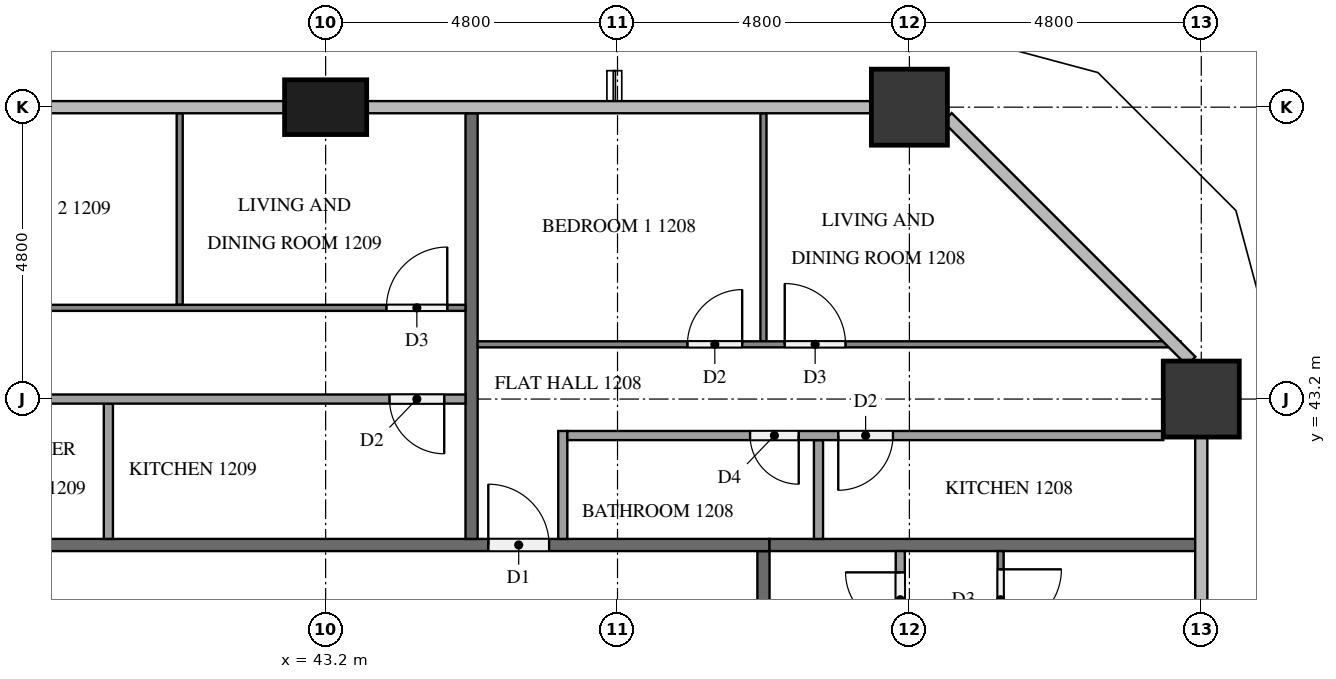
"""IFC4 building model, lengths in metres.
Left out: names, types, materials, properties, quantities, classifications, styles, units other than length and angle.
Written with IfcOpenShell. Run it as: python <this file> out.ifc"""

import sys

from ifc_helpers import new_model, si_unit, direction, frame, frame_2d, origin, origin_2d, place, context, subcontext, project, spatial, rectangle, extrude, element, fill, save


model = new_model("IFC4")
c1 = context("Model", 3, precision=1e-05, world=origin(), true_north=direction((0.0, 1.0)))
c2 = subcontext(c1, "Body", "Model", "MODEL_VIEW")
j1 = project(units=[si_unit("LENGTHUNIT", "METRE"), si_unit("PLANEANGLEUNIT", "RADIAN")], contexts=[c1])
p1 = place(None, origin())
s1 = spatial("IfcSite", under=j1, at=p1, CompositionType="ELEMENT")
p2 = place(p1, origin())
s2 = spatial("IfcBuilding", under=s1, at=p2, CompositionType="ELEMENT")
p3 = place(p2, frame((0.0, 0.0, 50.4)))
s3 = spatial("IfcBuildingStorey", under=s2, at=p3, CompositionType="ELEMENT", Elevation=50.4)
for number, where, z_axis, x_axis in (
    (1, (57.6, 43.2, 0.0), (0.0, 0.0, 1.0), (1.0, 0.0, 0.0)),
    (2, (52.8, 48.0, 0.0), (0.0, 0.0, 1.0), (1.0, 0.0, 0.0)),
):
    element("IfcColumn", number, at=place(p3, frame(where, z_axis=z_axis, x_axis=x_axis)), inside=s3, PredefinedType="COLUMN", context=c2, shape_type="SweptSolid", body=[
        extrude(rectangle(XDim=1.25, YDim=1.25, at=origin_2d()), origin(), (0.0, 0.0, 1.0), 3.1),
    ])
p4 = place(p3, frame((43.2, 48.0, 0.0), z_axis=(0.0, 0.0, 1.0), x_axis=(1.0, 0.0, 0.0)))
e3 = element("IfcColumn", 3, at=p4, inside=s3, PredefinedType="COLUMN", context=c2, shape_type="SweptSolid", body=[
    extrude(rectangle(XDim=1.35, YDim=0.9, at=origin_2d()), origin(), (0.0, 0.0, 1.0), 3.1),
])
p5 = place(p3, frame((50.4, 40.7, 0.0), z_axis=(0.0, 0.0, 1.0), x_axis=(0.0, -1.0, 0.0)))
e4 = element("IfcWall", 4, at=p5, inside=s3, PredefinedType="PARTITIONING", context=c2, shape_type="SweptSolid", body=[
    extrude(rectangle(XDim=28.6, YDim=0.2, at=frame_2d((14.3, 0.0))), origin(), (0.0, 0.0, 1.0), 3.1),
])
p6 = place(p5, frame((21.725, 0.0, 0.0)))
e5 = element("IfcOpeningElement", 5, at=p6, cuts=e4, PredefinedType="OPENING", context=c2, shape_type="SweptSolid", body=[
    extrude(rectangle(XDim=1.1, YDim=2.1, at=frame_2d((0.55, 1.05))), frame((0.0, 0.11, 0.0), z_axis=(0.0, -1.0, 0.0), x_axis=(1.0, 0.0, 0.0)), (0.0, 0.0, 1.0), 0.22),
])
p7 = place(p5, frame((12.175, 0.0, 0.0)))
e6 = element("IfcOpeningElement", 6, at=p7, cuts=e4, PredefinedType="OPENING", context=c2, shape_type="SweptSolid", body=[
    extrude(rectangle(XDim=1.0, YDim=2.1, at=frame_2d((0.5, 1.05))), frame((0.0, 0.11, 0.0), z_axis=(0.0, -1.0, 0.0), x_axis=(1.0, 0.0, 0.0)), (0.0, 0.0, 1.0), 0.22),
])
p8 = place(p5, frame((10.625, 0.0, 0.0)))
e7 = element("IfcOpeningElement", 7, at=p8, cuts=e4, PredefinedType="OPENING", context=c2, shape_type="SweptSolid", body=[
    extrude(rectangle(XDim=1.0, YDim=2.1, at=frame_2d((0.5, 1.05))), frame((0.0, 0.11, 0.0), z_axis=(0.0, -1.0, 0.0), x_axis=(1.0, 0.0, 0.0)), (0.0, 0.0, 1.0), 0.22),
])
p9 = place(p3, frame((11.9, 40.8, 0.0), z_axis=(0.0, 0.0, 1.0), x_axis=(1.0, 0.0, 0.0)))
e8 = element("IfcWall", 8, at=p9, inside=s3, PredefinedType="PARTITIONING", context=c2, shape_type="SweptSolid", body=[
    extrude(rectangle(XDim=38.6, YDim=0.2, at=frame_2d((19.3, 0.0))), origin(), (0.0, 0.0, 1.0), 3.1),
])
p10 = place(p9, frame((33.975, 0.0, 0.0)))
e9 = element("IfcOpeningElement", 9, at=p10, cuts=e8, PredefinedType="OPENING", context=c2, shape_type="SweptSolid", body=[
    extrude(rectangle(XDim=1.0, YDim=2.1, at=frame_2d((0.5, 1.05))), frame((0.0, 0.11, 0.0), z_axis=(0.0, -1.0, 0.0), x_axis=(1.0, 0.0, 0.0)), (0.0, 0.0, 1.0), 0.22),
])
p11 = place(p9, frame((19.575, 0.0, 0.0)))
e10 = element("IfcOpeningElement", 10, at=p11, cuts=e8, PredefinedType="OPENING", context=c2, shape_type="SweptSolid", body=[
    extrude(rectangle(XDim=1.0, YDim=2.1, at=frame_2d((0.5, 1.05))), frame((0.0, 0.11, 0.0), z_axis=(0.0, -1.0, 0.0), x_axis=(1.0, 0.0, 0.0)), (0.0, 0.0, 1.0), 0.22),
])
p12 = place(p9, frame((18.025, 0.0, 0.0)))
e11 = element("IfcOpeningElement", 11, at=p12, cuts=e8, PredefinedType="OPENING", context=c2, shape_type="SweptSolid", body=[
    extrude(rectangle(XDim=1.0, YDim=2.1, at=frame_2d((0.5, 1.05))), frame((0.0, 0.11, 0.0), z_axis=(0.0, -1.0, 0.0), x_axis=(1.0, 0.0, 0.0)), (0.0, 0.0, 1.0), 0.22),
])
p13 = place(p9, frame((3.625, 0.0, 0.0)))
e12 = element("IfcOpeningElement", 12, at=p13, cuts=e8, PredefinedType="OPENING", context=c2, shape_type="SweptSolid", body=[
    extrude(rectangle(XDim=1.0, YDim=2.1, at=frame_2d((0.5, 1.05))), frame((0.0, 0.11, 0.0), z_axis=(0.0, -1.0, 0.0), x_axis=(1.0, 0.0, 0.0)), (0.0, 0.0, 1.0), 0.22),
])
for number, where, z_axis, x_axis in (
    (13, (50.5, 40.8, 0.0), (0.0, 0.0, 1.0), (1.0, 0.0, 0.0)),
    (14, (45.6, 47.9, 0.0), (0.0, 0.0, 1.0), (0.0, -1.0, 0.0)),
):
    element("IfcWall", number, at=place(p3, frame(where, z_axis=z_axis, x_axis=x_axis)), inside=s3, PredefinedType="PARTITIONING", context=c2, shape_type="SweptSolid", body=[
        extrude(rectangle(XDim=7.0, YDim=0.2, at=frame_2d((3.5, 0.0))), origin(), (0.0, 0.0, 1.0), 3.1),
    ])
p14 = place(p3, frame((54.3, 40.7, 0.0), z_axis=(0.0, 0.0, 1.0), x_axis=(0.0, -1.0, 0.0)))
e15 = element("IfcWall", 15, at=p14, inside=s3, PredefinedType="PARTITIONING", context=c2, shape_type="SweptSolid", body=[
    extrude(rectangle(XDim=11.8, YDim=0.1, at=frame_2d((5.9, 0.0))), origin(), (0.0, 0.0, 1.0), 3.1),
])
p15 = place(p14, frame((10.6, 0.0, 0.0)))
e16 = element("IfcOpeningElement", 16, at=p15, cuts=e15, PredefinedType="OPENING", context=c2, shape_type="SweptSolid", body=[
    extrude(rectangle(XDim=0.9, YDim=2.1, at=frame_2d((0.45, 1.05))), frame((0.0, 0.06, 0.0), z_axis=(0.0, -1.0, 0.0), x_axis=(1.0, 0.0, 0.0)), (0.0, 0.0, 1.0), 0.12),
])
p16 = place(p14, frame((0.3, 0.0, 0.0)))
e17 = element("IfcOpeningElement", 17, at=p16, cuts=e15, PredefinedType="OPENING", context=c2, shape_type="SweptSolid", body=[
    extrude(rectangle(XDim=1.0, YDim=2.1, at=frame_2d((0.5, 1.05))), frame((0.0, 0.06, 0.0), z_axis=(0.0, -1.0, 0.0), x_axis=(1.0, 0.0, 0.0)), (0.0, 0.0, 1.0), 0.12),
])
p17 = place(p3, frame((52.65, 30.375, 0.0), z_axis=(0.0, 0.0, 1.0), x_axis=(0.0, 1.0, 0.0)))
e18 = element("IfcWall", 18, at=p17, inside=s3, PredefinedType="PARTITIONING", context=c2, shape_type="SweptSolid", body=[
    extrude(rectangle(XDim=10.325, YDim=0.15, at=frame_2d((5.163, 0.0))), origin(), (0.0, 0.0, 1.0), 3.1),
])
p18 = place(p17, frame((0.3, 0.0, 0.0)))
e19 = element("IfcOpeningElement", 19, at=p18, cuts=e18, PredefinedType="OPENING", context=c2, shape_type="SweptSolid", body=[
    extrude(rectangle(XDim=0.8, YDim=2.1, at=frame_2d((0.4, 1.05))), frame((0.0, 0.085, 0.0), z_axis=(0.0, -1.0, 0.0), x_axis=(1.0, 0.0, 0.0)), (0.0, 0.0, 1.0), 0.17),
])
p19 = place(p17, frame((9.075, 0.0, 0.0)))
e20 = element("IfcOpeningElement", 20, at=p19, cuts=e18, PredefinedType="OPENING", context=c2, shape_type="SweptSolid", body=[
    extrude(rectangle(XDim=0.9, YDim=2.1, at=frame_2d((0.45, 1.05))), frame((0.0, 0.085, 0.0), z_axis=(0.0, -1.0, 0.0), x_axis=(1.0, 0.0, 0.0)), (0.0, 0.0, 1.0), 0.17),
])
p20 = place(p3, frame((50.4, 44.15, 0.0), z_axis=(0.0, 0.0, 1.0), x_axis=(0.0, 1.0, 0.0)))
e21 = element("IfcWall", 21, at=p20, inside=s3, PredefinedType="PARTITIONING", context=c2, shape_type="SweptSolid", body=[
    extrude(rectangle(XDim=3.75, YDim=0.1, at=frame_2d((1.875, 0.0))), origin(), (0.0, 0.0, 1.0), 3.1),
])
p21 = place(p3, frame((45.7, 44.1, 0.0), z_axis=(0.0, 0.0, 1.0), x_axis=(1.0, 0.0, 0.0)))
e22 = element("IfcWall", 22, at=p21, inside=s3, PredefinedType="PARTITIONING", context=c2, shape_type="SweptSolid", body=[
    extrude(rectangle(XDim=11.559, YDim=0.1, at=frame_2d((5.779, 0.0))), origin(), (0.0, 0.0, 1.0), 3.1),
])
p22 = place(p21, frame((3.45, 0.0, 0.0)))
e23 = element("IfcOpeningElement", 23, at=p22, cuts=e22, PredefinedType="OPENING", context=c2, shape_type="SweptSolid", body=[
    extrude(rectangle(XDim=0.9, YDim=2.1, at=frame_2d((0.45, 1.05))), frame((0.0, 0.06, 0.0), z_axis=(0.0, -1.0, 0.0), x_axis=(1.0, 0.0, 0.0)), (0.0, 0.0, 1.0), 0.12),
])
p23 = place(p21, frame((5.05, 0.0, 0.0)))
e24 = element("IfcOpeningElement", 24, at=p23, cuts=e22, PredefinedType="OPENING", context=c2, shape_type="SweptSolid", body=[
    extrude(rectangle(XDim=1.0, YDim=2.1, at=frame_2d((0.5, 1.05))), frame((0.0, 0.06, 0.0), z_axis=(0.0, -1.0, 0.0), x_axis=(1.0, 0.0, 0.0)), (0.0, 0.0, 1.0), 0.12),
])
p24 = place(p3, frame((51.305, 40.9, 0.0), z_axis=(0.0, 0.0, 1.0), x_axis=(0.0, 1.0, 0.0)))
e25 = element("IfcWall", 25, at=p24, inside=s3, PredefinedType="PARTITIONING", context=c2, shape_type="SweptSolid", body=[
    extrude(rectangle(XDim=1.625, YDim=0.15, at=frame_2d((0.812, 0.0))), origin(), (0.0, 0.0, 1.0), 3.1),
])
p25 = place(p3, frame((47.1, 40.9, 0.0), z_axis=(0.0, 0.0, 1.0), x_axis=(0.0, 1.0, 0.0)))
e26 = element("IfcWall", 26, at=p25, inside=s3, PredefinedType="PARTITIONING", context=c2, shape_type="SweptSolid", body=[
    extrude(rectangle(XDim=1.775, YDim=0.15, at=frame_2d((0.888, 0.0))), origin(), (0.0, 0.0, 1.0), 3.1),
])
p26 = place(p3, frame((56.975, 42.6, 0.0), z_axis=(0.0, 0.0, 1.0), x_axis=(-1.0, 0.0, 0.0)))
e27 = element("IfcWall", 27, at=p26, inside=s3, PredefinedType="PARTITIONING", context=c2, shape_type="SweptSolid", body=[
    extrude(rectangle(XDim=9.8, YDim=0.15, at=frame_2d((4.9, 0.0))), origin(), (0.0, 0.0, 1.0), 3.1),
])
p27 = place(p26, frame((5.995, 0.0, 0.0)))
e28 = element("IfcOpeningElement", 28, at=p27, cuts=e27, PredefinedType="OPENING", context=c2, shape_type="SweptSolid", body=[
    extrude(rectangle(XDim=0.8, YDim=2.1, at=frame_2d((0.4, 1.05))), frame((0.0, 0.085, 0.0), z_axis=(0.0, -1.0, 0.0), x_axis=(1.0, 0.0, 0.0)), (0.0, 0.0, 1.0), 0.17),
])
p28 = place(p26, frame((4.445, 0.0, 0.0)))
e29 = element("IfcOpeningElement", 29, at=p28, cuts=e27, PredefinedType="OPENING", context=c2, shape_type="SweptSolid", body=[
    extrude(rectangle(XDim=0.9, YDim=2.1, at=frame_2d((0.45, 1.05))), frame((0.0, 0.085, 0.0), z_axis=(0.0, -1.0, 0.0), x_axis=(1.0, 0.0, 0.0)), (0.0, 0.0, 1.0), 0.17),
])
p29 = place(p3, frame((40.8, 44.75, 0.0), z_axis=(0.0, 0.0, 1.0), x_axis=(0.0, 1.0, 0.0)))
e30 = element("IfcWall", 30, at=p29, inside=s3, PredefinedType="PARTITIONING", context=c2, shape_type="SweptSolid", body=[
    extrude(rectangle(XDim=3.15, YDim=0.1, at=frame_2d((1.575, 0.0))), origin(), (0.0, 0.0, 1.0), 3.1),
])
p30 = place(p3, frame((31.3, 44.7, 0.0), z_axis=(0.0, 0.0, 1.0), x_axis=(1.0, 0.0, 0.0)))
e31 = element("IfcWall", 31, at=p30, inside=s3, PredefinedType="PARTITIONING", context=c2, shape_type="SweptSolid", body=[
    extrude(rectangle(XDim=14.2, YDim=0.1, at=frame_2d((7.1, 0.0))), origin(), (0.0, 0.0, 1.0), 3.1),
])
p31 = place(p30, frame((3.45, 0.0, 0.0)))
e32 = element("IfcOpeningElement", 32, at=p31, cuts=e31, PredefinedType="OPENING", context=c2, shape_type="SweptSolid", body=[
    extrude(rectangle(XDim=0.9, YDim=2.1, at=frame_2d((0.45, 1.05))), frame((0.0, 0.06, 0.0), z_axis=(0.0, -1.0, 0.0), x_axis=(1.0, 0.0, 0.0)), (0.0, 0.0, 1.0), 0.12),
])
p32 = place(p30, frame((5.05, 0.0, 0.0)))
e33 = element("IfcOpeningElement", 33, at=p32, cuts=e31, PredefinedType="OPENING", context=c2, shape_type="SweptSolid", body=[
    extrude(rectangle(XDim=0.9, YDim=2.1, at=frame_2d((0.45, 1.05))), frame((0.0, 0.06, 0.0), z_axis=(0.0, -1.0, 0.0), x_axis=(1.0, 0.0, 0.0)), (0.0, 0.0, 1.0), 0.12),
])
p33 = place(p30, frame((12.9, 0.0, 0.0)))
e34 = element("IfcOpeningElement", 34, at=p33, cuts=e31, PredefinedType="OPENING", context=c2, shape_type="SweptSolid", body=[
    extrude(rectangle(XDim=1.0, YDim=2.1, at=frame_2d((0.5, 1.05))), frame((0.0, 0.06, 0.0), z_axis=(0.0, -1.0, 0.0), x_axis=(1.0, 0.0, 0.0)), (0.0, 0.0, 1.0), 0.12),
])
p34 = place(p3, frame((39.627, 40.9, 0.0), z_axis=(0.0, 0.0, 1.0), x_axis=(0.0, 1.0, 0.0)))
e35 = element("IfcWall", 35, at=p34, inside=s3, PredefinedType="PARTITIONING", context=c2, shape_type="SweptSolid", body=[
    extrude(rectangle(XDim=2.225, YDim=0.15, at=frame_2d((1.113, 0.0))), origin(), (0.0, 0.0, 1.0), 3.1),
])
p35 = place(p3, frame((45.5, 43.2, 0.0), z_axis=(0.0, 0.0, 1.0), x_axis=(-1.0, 0.0, 0.0)))
e36 = element("IfcWall", 36, at=p35, inside=s3, PredefinedType="PARTITIONING", context=c2, shape_type="SweptSolid", body=[
    extrude(rectangle(XDim=12.725, YDim=0.15, at=frame_2d((6.363, 0.0))), origin(), (0.0, 0.0, 1.0), 3.1),
])
p36 = place(p35, frame((9.135, 0.0, 0.0)))
e37 = element("IfcOpeningElement", 37, at=p36, cuts=e36, PredefinedType="OPENING", context=c2, shape_type="SweptSolid", body=[
    extrude(rectangle(XDim=0.9, YDim=2.1, at=frame_2d((0.45, 1.05))), frame((0.0, 0.085, 0.0), z_axis=(0.0, -1.0, 0.0), x_axis=(1.0, 0.0, 0.0)), (0.0, 0.0, 1.0), 0.17),
])
p37 = place(p35, frame((7.685, 0.0, 0.0)))
e38 = element("IfcOpeningElement", 38, at=p37, cuts=e36, PredefinedType="OPENING", context=c2, shape_type="SweptSolid", body=[
    extrude(rectangle(XDim=0.8, YDim=2.1, at=frame_2d((0.4, 1.05))), frame((0.0, 0.085, 0.0), z_axis=(0.0, -1.0, 0.0), x_axis=(1.0, 0.0, 0.0)), (0.0, 0.0, 1.0), 0.17),
])
p38 = place(p35, frame((0.35, 0.0, 0.0)))
e39 = element("IfcOpeningElement", 39, at=p38, cuts=e36, PredefinedType="OPENING", context=c2, shape_type="SweptSolid", body=[
    extrude(rectangle(XDim=0.9, YDim=2.1, at=frame_2d((0.45, 1.05))), frame((0.0, 0.085, 0.0), z_axis=(0.0, -1.0, 0.0), x_axis=(1.0, 0.0, 0.0)), (0.0, 0.0, 1.0), 0.17),
])
p39 = place(p10, origin())
e40 = element("IfcDoor", 40, at=p39, inside=s3, OperationType="SINGLE_SWING_LEFT", PredefinedType="DOOR", context=c2, shape_type="SweptSolid", body=[
    extrude(rectangle(XDim=1.0, YDim=2.1, at=frame_2d((0.5, 1.05))), frame((0.0, 0.025, 0.0), z_axis=(0.0, -1.0, 0.0), x_axis=(1.0, 0.0, 0.0)), (0.0, 0.0, 1.0), 0.05),
])
fill(e9, e40)
p40 = place(p16, origin())
e41 = element("IfcDoor", 41, at=p40, inside=s3, OperationType="SINGLE_SWING_LEFT", PredefinedType="DOOR", context=c2, shape_type="SweptSolid", body=[
    extrude(rectangle(XDim=1.0, YDim=2.1, at=frame_2d((0.5, 1.05))), frame((0.0, 0.025, 0.0), z_axis=(0.0, -1.0, 0.0), x_axis=(1.0, 0.0, 0.0)), (0.0, 0.0, 1.0), 0.05),
])
fill(e17, e41)
p41 = place(p19, origin())
e42 = element("IfcDoor", 42, at=p41, inside=s3, OperationType="SINGLE_SWING_RIGHT", PredefinedType="DOOR", context=c2, shape_type="SweptSolid", body=[
    extrude(rectangle(XDim=0.9, YDim=2.1, at=frame_2d((0.45, 1.05))), frame((0.0, 0.025, 0.0), z_axis=(0.0, -1.0, 0.0), x_axis=(1.0, 0.0, 0.0)), (0.0, 0.0, 1.0), 0.05),
])
fill(e20, e42)
p42 = place(p22, origin())
e43 = element("IfcDoor", 43, at=p42, inside=s3, OperationType="SINGLE_SWING_RIGHT", PredefinedType="DOOR", context=c2, shape_type="SweptSolid", body=[
    extrude(rectangle(XDim=0.9, YDim=2.1, at=frame_2d((0.45, 1.05))), frame((0.0, 0.025, 0.0), z_axis=(0.0, -1.0, 0.0), x_axis=(1.0, 0.0, 0.0)), (0.0, 0.0, 1.0), 0.05),
])
fill(e23, e43)
p43 = place(p23, origin())
e44 = element("IfcDoor", 44, at=p43, inside=s3, OperationType="SINGLE_SWING_LEFT", PredefinedType="DOOR", context=c2, shape_type="SweptSolid", body=[
    extrude(rectangle(XDim=1.0, YDim=2.1, at=frame_2d((0.5, 1.05))), frame((0.0, 0.025, 0.0), z_axis=(0.0, -1.0, 0.0), x_axis=(1.0, 0.0, 0.0)), (0.0, 0.0, 1.0), 0.05),
])
fill(e24, e44)
p44 = place(p27, origin())
e45 = element("IfcDoor", 45, at=p44, inside=s3, OperationType="SINGLE_SWING_LEFT", PredefinedType="DOOR", context=c2, shape_type="SweptSolid", body=[
    extrude(rectangle(XDim=0.8, YDim=2.1, at=frame_2d((0.4, 1.05))), frame((0.0, 0.025, 0.0), z_axis=(0.0, -1.0, 0.0), x_axis=(1.0, 0.0, 0.0)), (0.0, 0.0, 1.0), 0.05),
])
fill(e28, e45)
p45 = place(p28, origin())
e46 = element("IfcDoor", 46, at=p45, inside=s3, OperationType="SINGLE_SWING_RIGHT", PredefinedType="DOOR", context=c2, shape_type="SweptSolid", body=[
    extrude(rectangle(XDim=0.9, YDim=2.1, at=frame_2d((0.45, 1.05))), frame((0.0, 0.025, 0.0), z_axis=(0.0, -1.0, 0.0), x_axis=(1.0, 0.0, 0.0)), (0.0, 0.0, 1.0), 0.05),
])
fill(e29, e46)
p46 = place(p33, origin())
e47 = element("IfcDoor", 47, at=p46, inside=s3, OperationType="SINGLE_SWING_RIGHT", PredefinedType="DOOR", context=c2, shape_type="SweptSolid", body=[
    extrude(rectangle(XDim=1.0, YDim=2.1, at=frame_2d((0.5, 1.05))), frame((0.0, 0.025, 0.0), z_axis=(0.0, -1.0, 0.0), x_axis=(1.0, 0.0, 0.0)), (0.0, 0.0, 1.0), 0.05),
])
fill(e34, e47)
p47 = place(p38, origin())
e48 = element("IfcDoor", 48, at=p47, inside=s3, OperationType="SINGLE_SWING_LEFT", PredefinedType="DOOR", context=c2, shape_type="SweptSolid", body=[
    extrude(rectangle(XDim=0.9, YDim=2.1, at=frame_2d((0.45, 1.05))), frame((0.0, 0.025, 0.0), z_axis=(0.0, -1.0, 0.0), x_axis=(1.0, 0.0, 0.0)), (0.0, 0.0, 1.0), 0.05),
])
fill(e39, e48)
save(model, sys.argv[1])
